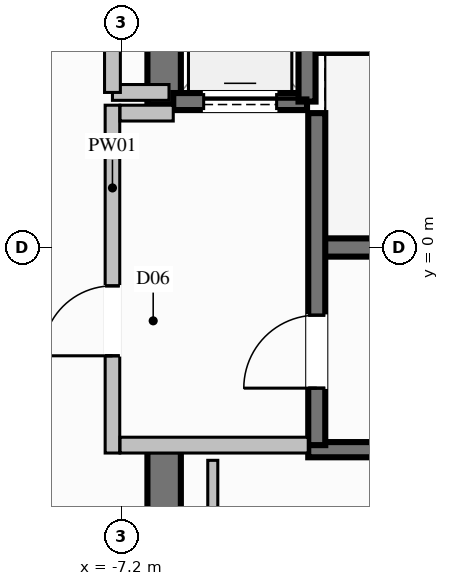
"""IFC4 building model, lengths in metres.
Left out: names, types, materials, properties, quantities, classifications, styles, units other than length and angle.
Written with IfcOpenShell. Run it as: python <this file> out.ifc"""

import sys

from ifc_helpers import new_model, si_unit, direction, frame, frame_2d, origin, place, context, subcontext, project, spatial, rectangle, extrude, element, fill, save


model = new_model("IFC4")
c1 = context("Model", 3, precision=1e-05, world=origin(), true_north=direction((0.0, 1.0)))
c2 = subcontext(c1, "Body", "Model", "MODEL_VIEW")
j1 = project(units=[si_unit("LENGTHUNIT", "METRE"), si_unit("PLANEANGLEUNIT", "RADIAN")], contexts=[c1])
p1 = place(None, origin())
s1 = spatial("IfcSite", under=j1, at=p1, CompositionType="ELEMENT")
p2 = place(p1, origin())
s2 = spatial("IfcBuilding", under=s1, at=p2, CompositionType="ELEMENT")
p3 = place(p2, frame((0.0, 0.0, 168.6)))
s3 = spatial("IfcBuildingStorey", under=s2, at=p3, CompositionType="ELEMENT", Elevation=168.6)
p4 = place(p3, frame((-3.99, 0.0, 0.0), z_axis=(0.0, 0.0, 1.0), x_axis=(1.0, 0.0, 0.0)))
e1 = element("IfcWall", 1, at=p4, inside=s3, PredefinedType="SHEAR", context=c2, shape_type="SweptSolid", body=[
    extrude(rectangle(XDim=7.98, YDim=0.3, at=frame_2d((3.99, 0.0))), origin(), (0.0, 0.0, 1.0), 4.6),
])
for number, where, z_axis, x_axis in (
    (2, (-4.13, -3.325, 0.0), (0.0, 0.0, 1.0), (1.0, 0.0, 0.0)),
    (3, (-4.13, 3.325, 0.0), (0.0, 0.0, 1.0), (1.0, 0.0, 0.0)),
):
    element("IfcWall", number, at=place(p3, frame(where, z_axis=z_axis, x_axis=x_axis)), inside=s3, PredefinedType="SOLIDWALL", context=c2, shape_type="SweptSolid", body=[
        extrude(rectangle(XDim=8.26, YDim=0.25, at=frame_2d((4.13, 0.0))), origin(), (0.0, 0.0, 1.0), 4.6),
    ])
p5 = place(p3, frame((-6.5, 2.35, 0.0), z_axis=(0.0, 0.0, 1.0), x_axis=(0.0, 1.0, 0.0)))
e4 = element("IfcWall", 4, at=p5, inside=s3, PredefinedType="SHEAR", context=c2, shape_type="SweptSolid", body=[
    extrude(rectangle(XDim=4.025, YDim=0.55, at=frame_2d((2.012, 0.0))), origin(), (0.0, 0.0, 1.0), 4.6),
])
p6 = place(p3, frame((-6.5, -6.375, 0.0), z_axis=(0.0, 0.0, 1.0), x_axis=(0.0, 1.0, 0.0)))
e5 = element("IfcWall", 5, at=p6, inside=s3, PredefinedType="SHEAR", context=c2, shape_type="SweptSolid", body=[
    extrude(rectangle(XDim=3.025, YDim=0.55, at=frame_2d((1.512, 0.0))), origin(), (0.0, 0.0, 1.0), 4.6),
])
p7 = place(p3, frame((-6.35, 2.4, 0.0), z_axis=(0.0, 0.0, 1.0), x_axis=(1.0, 0.0, 0.0)))
e6 = element("IfcWall", 6, at=p7, inside=s3, PredefinedType="SOLIDWALL", context=c2, shape_type="SweptSolid", body=[
    extrude(rectangle(XDim=2.2, YDim=0.28, at=frame_2d((1.1, 0.0))), origin(), (0.0, 0.0, 1.0), 4.36),
])
p8 = place(p7, frame((0.5, 0.0, 0.0)))
e7 = element("IfcOpeningElement", 7, at=p8, cuts=e6, PredefinedType="OPENING", context=c2, shape_type="SweptSolid", body=[
    extrude(rectangle(XDim=1.2, YDim=2.2, at=frame_2d((0.6, 1.1))), frame((0.0, 0.15, 0.0), z_axis=(0.0, -1.0, 0.0), x_axis=(1.0, 0.0, 0.0)), (0.0, 0.0, 1.0), 0.3),
])
p9 = place(p3, frame((-4.15, 2.4, 0.0), z_axis=(0.0, 0.0, 1.0), x_axis=(0.0, 1.0, 0.0)))
e8 = element("IfcWall", 8, at=p9, inside=s3, PredefinedType="SOLIDWALL", context=c2, shape_type="SweptSolid", body=[
    extrude(rectangle(XDim=2.7, YDim=0.28, at=frame_2d((1.35, 0.0))), origin(), (0.0, 0.0, 1.0), 4.36),
])
p10 = place(p3, frame((-3.99, -3.25, 0.0), z_axis=(0.0, 0.0, 1.0), x_axis=(0.0, 1.0, 0.0)))
e9 = element("IfcWall", 9, at=p10, inside=s3, PredefinedType="SOLIDWALL", context=c2, shape_type="SweptSolid", body=[
    extrude(rectangle(XDim=5.46, YDim=0.28, at=frame_2d((2.73, 0.0))), origin(), (0.0, 0.0, 1.0), 4.36),
])
p11 = place(p10, frame((0.937, 0.0, 0.0)))
e10 = element("IfcOpeningElement", 10, at=p11, cuts=e9, PredefinedType="OPENING", context=c2, shape_type="SweptSolid", body=[
    extrude(rectangle(XDim=1.2, YDim=2.2, at=frame_2d((0.6, 1.1))), frame((0.0, 0.15, 0.0), z_axis=(0.0, -1.0, 0.0), x_axis=(1.0, 0.0, 0.0)), (0.0, 0.0, 1.0), 0.3),
])
p12 = place(p3, frame((-7.35, -3.38, 0.0), z_axis=(0.0, 0.0, 1.0), x_axis=(0.0, 1.0, 0.0)))
e11 = element("IfcWall", 11, at=p12, inside=s3, PredefinedType="PARTITIONING", context=c2, shape_type="SweptSolid", body=[
    extrude(rectangle(XDim=5.72, YDim=0.24, at=frame_2d((2.86, 0.0))), origin(), (0.0, 0.0, 1.0), 3.245),
])
p13 = place(p12, frame((1.599, 0.0, 0.0)))
e12 = element("IfcOpeningElement", 12, at=p13, cuts=e11, PredefinedType="OPENING", context=c2, shape_type="SweptSolid", body=[
    extrude(rectangle(XDim=1.15, YDim=2.2, at=frame_2d((0.575, 1.1))), frame((0.0, 0.13, 0.0), z_axis=(0.0, -1.0, 0.0), x_axis=(1.0, 0.0, 0.0)), (0.0, 0.0, 1.0), 0.26),
])
p14 = place(p3, frame((-7.225, -3.25, 0.0), z_axis=(0.0, 0.0, 1.0), x_axis=(1.0, 0.0, 0.0)))
e13 = element("IfcWall", 13, at=p14, inside=s3, PredefinedType="PARTITIONING", context=c2, shape_type="SweptSolid", body=[
    extrude(rectangle(XDim=3.095, YDim=0.26, at=frame_2d((1.548, 0.0))), origin(), (0.0, 0.0, 1.0), 4.36),
])
p15 = place(p3, frame((-7.225, 2.21, 0.0), z_axis=(0.0, 0.0, 1.0), x_axis=(1.0, 0.0, 0.0)))
e14 = element("IfcWall", 14, at=p15, inside=s3, PredefinedType="PARTITIONING", context=c2, shape_type="SweptSolid", body=[
    extrude(rectangle(XDim=0.875, YDim=0.26, at=frame_2d((0.438, 0.0))), origin(), (0.0, 0.0, 1.0), 4.36),
])
p16 = place(p3, frame((-7.35, 2.55, 0.0), z_axis=(0.0, 0.0, 1.0), x_axis=(1.0, 0.0, 0.0)))
e15 = element("IfcWall", 15, at=p16, inside=s3, PredefinedType="PARTITIONING", context=c2, shape_type="SweptSolid", body=[
    extrude(rectangle(XDim=0.93, YDim=0.26, at=frame_2d((0.465, 0.0))), origin(), (0.0, 0.0, 1.0), 4.36),
])
p17 = place(p3, frame((-7.35, 2.55, 0.0), z_axis=(0.0, 0.0, 1.0), x_axis=(0.0, 1.0, 0.0)))
e16 = element("IfcWall", 16, at=p17, inside=s3, PredefinedType="PARTITIONING", context=c2, shape_type="SweptSolid", body=[
    extrude(rectangle(XDim=2.4, YDim=0.26, at=frame_2d((1.2, 0.0))), origin(), (0.0, 0.0, 1.0), 3.245),
])
p18 = place(p17, frame((0.775, 0.0, 0.0)))
e17 = element("IfcOpeningElement", 17, at=p18, cuts=e16, PredefinedType="OPENING", context=c2, shape_type="SweptSolid", body=[
    extrude(rectangle(XDim=0.85, YDim=2.05, at=frame_2d((0.425, 1.025))), frame((0.0, 0.14, 0.0), z_axis=(0.0, -1.0, 0.0), x_axis=(1.0, 0.0, 0.0)), (0.0, 0.0, 1.0), 0.28),
])
p19 = place(p3, frame((-5.7, -3.5, 0.0), z_axis=(0.0, 0.0, 1.0), x_axis=(0.0, -1.0, 0.0)))
e18 = element("IfcWall", 18, at=p19, inside=s3, PredefinedType="PARTITIONING", context=c2, shape_type="SweptSolid", body=[
    extrude(rectangle(XDim=3.35, YDim=0.165, at=frame_2d((1.675, 0.0))), origin(), (0.0, 0.0, 1.0), 3.245),
])
p20 = place(p8, origin())
e19 = element("IfcDoor", 19, at=p20, inside=s3, OperationType="SLIDING_TO_LEFT", PredefinedType="DOOR", context=c2, shape_type="SweptSolid", body=[
    extrude(rectangle(XDim=1.2, YDim=2.2, at=frame_2d((0.6, 1.1))), frame((0.0, 0.025, 0.0), z_axis=(0.0, -1.0, 0.0), x_axis=(1.0, 0.0, 0.0)), (0.0, 0.0, 1.0), 0.05),
])
fill(e7, e19)
p21 = place(p11, origin())
e20 = element("IfcDoor", 20, at=p21, inside=s3, OperationType="SINGLE_SWING_LEFT", PredefinedType="DOOR", context=c2, shape_type="SweptSolid", body=[
    extrude(rectangle(XDim=1.2, YDim=2.2, at=frame_2d((0.6, 1.1))), frame((0.0, 0.025, 0.0), z_axis=(0.0, -1.0, 0.0), x_axis=(1.0, 0.0, 0.0)), (0.0, 0.0, 1.0), 0.05),
])
fill(e10, e20)
p22 = place(p13, origin())
e21 = element("IfcDoor", 21, at=p22, inside=s3, OperationType="SINGLE_SWING_LEFT", PredefinedType="DOOR", context=c2, shape_type="SweptSolid", body=[
    extrude(rectangle(XDim=1.15, YDim=2.2, at=frame_2d((0.575, 1.1))), frame((0.0, 0.025, 0.0), z_axis=(0.0, -1.0, 0.0), x_axis=(1.0, 0.0, 0.0)), (0.0, 0.0, 1.0), 0.05),
])
fill(e12, e21)
save(model, sys.argv[1])
